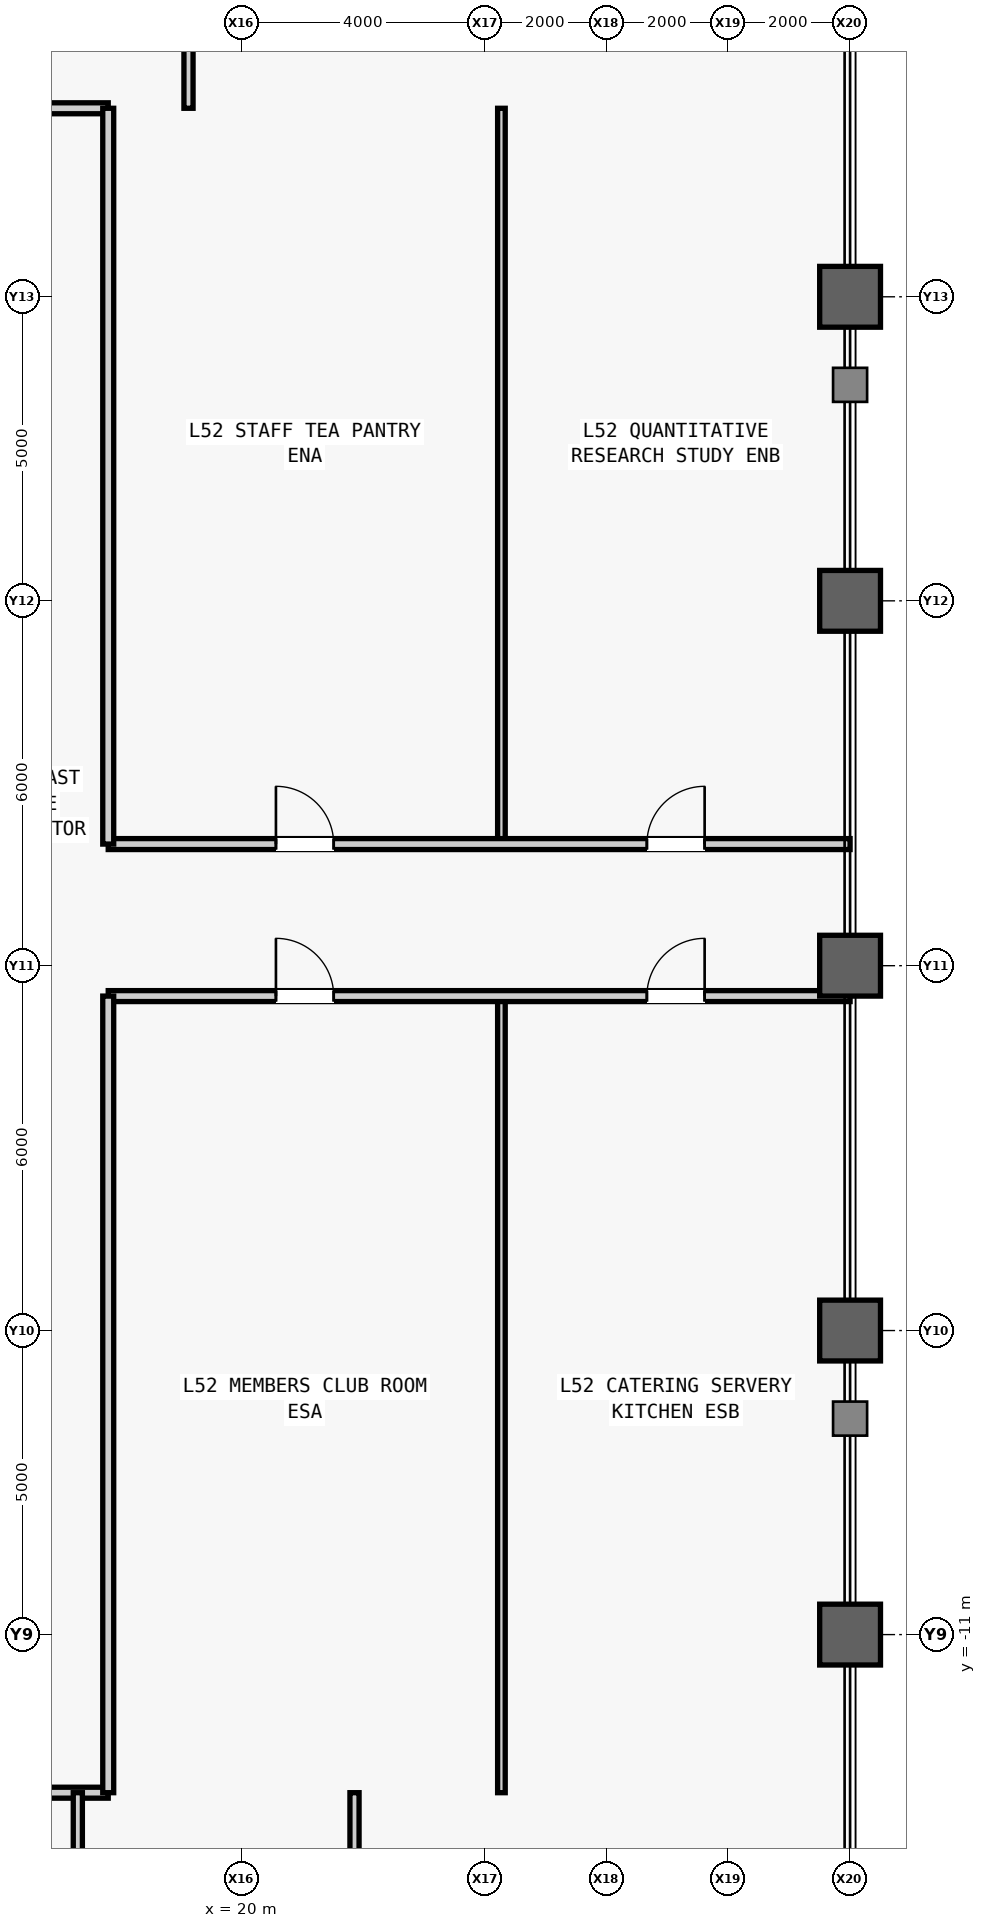
"""IFC4 building model, lengths in metres.
Left out: names, types, materials, properties, quantities, classifications, styles, units other than length and angle.
Written with IfcOpenShell. Run it as: python <this file> out.ifc"""

import sys

from ifc_helpers import new_model, si_unit, direction, frame, frame_2d, origin, origin_2d, place, context, subcontext, project, spatial, rectangle, hollow_rectangle, extrude, source, transform, mapped, element, fill, save


model = new_model("IFC4")
c1 = context("Model", 3, precision=1e-05, world=origin(), true_north=direction((0.0, 1.0)))
c2 = subcontext(c1, "Body", "Model", "MODEL_VIEW")
j1 = project(units=[si_unit("LENGTHUNIT", "METRE"), si_unit("PLANEANGLEUNIT", "RADIAN")], contexts=[c1])
p1 = place(None, origin())
s1 = spatial("IfcSite", under=j1, at=p1, CompositionType="ELEMENT")
p2 = place(p1, origin())
s2 = spatial("IfcBuilding", under=s1, at=p2, CompositionType="ELEMENT")
p3 = place(p2, frame((0.0, 0.0, 223.1)))
s3 = spatial("IfcBuildingStorey", under=s2, at=p3, CompositionType="ELEMENT", Elevation=223.1)
m1 = source(origin(), c2, "Body", "SweptSolid", [
    extrude(hollow_rectangle(XDim=1.0, YDim=1.0, WallThickness=0.055, at=origin_2d()), origin(), (0.0, 0.0, 1.0), 4.0),
])
for number, where, z_axis, x_axis in (
    (1, (30.0, -11.0, 0.0), (0.0, 0.0, 1.0), (1.0, 0.0, 0.0)),
    (2, (30.0, -6.0, 0.0), (0.0, 0.0, 1.0), (1.0, 0.0, 0.0)),
    (3, (30.0, 0.0, 0.0), (0.0, 0.0, 1.0), (1.0, 0.0, 0.0)),
    (4, (30.0, 6.0, 0.0), (0.0, 0.0, 1.0), (1.0, 0.0, 0.0)),
    (5, (30.0, 11.0, 0.0), (0.0, 0.0, 1.0), (1.0, 0.0, 0.0)),
):
    element("IfcColumn", number, at=place(p3, frame(where, z_axis=z_axis, x_axis=x_axis)), inside=s3, PredefinedType="COLUMN", context=c2, shape_type="MappedRepresentation", body=[
        mapped(m1, transform((0.0, 0.0, 0.0), scale=1.0)),
    ])
m2 = source(origin(), c2, "Body", "SweptSolid", [
    extrude(rectangle(XDim=2.45, YDim=0.18, at=frame_2d((1.225, 0.0))), origin(), (0.0, 0.0, 1.0), 3.78),
])
for number, where, z_axis, x_axis in (
    (6, (15.35, -13.6, 0.0), (0.0, 0.0, 1.0), (1.0, 0.0, 0.0)),
    (7, (15.35, 14.1, 0.0), (0.0, 0.0, 1.0), (1.0, 0.0, 0.0)),
):
    element("IfcWall", number, at=place(p3, frame(where, z_axis=z_axis, x_axis=x_axis)), inside=s3, PredefinedType="PARTITIONING", context=c2, shape_type="MappedRepresentation", body=[
        mapped(m2, transform((0.0, 0.0, 0.0), scale=1.0)),
    ])
m3 = source(origin(), c2, "Body", "SweptSolid", [
    extrude(rectangle(XDim=16.4, YDim=0.15, at=frame_2d((8.2, 0.0))), origin(), (0.0, 0.0, 1.0), 3.78),
])
p4 = place(p3, frame((17.3, -30.0, 0.0), z_axis=(0.0, 0.0, 1.0), x_axis=(0.0, 1.0, 0.0)))
e8 = element("IfcWall", 8, at=p4, inside=s3, PredefinedType="PARTITIONING", context=c2, shape_type="MappedRepresentation", body=[
    mapped(m3, transform((0.0, 0.0, 0.0), scale=1.0)),
])
m4 = source(origin(), c2, "Body", "SweptSolid", [
    extrude(rectangle(XDim=0.95, YDim=2.15, at=frame_2d((0.475, 1.075))), frame((0.0, 0.085, 0.0), z_axis=(0.0, -1.0, 0.0), x_axis=(1.0, 0.0, 0.0)), (0.0, 0.0, 1.0), 0.17),
])
p5 = place(p4, frame((11.825, 0.0, 0.0)))
e9 = element("IfcOpeningElement", 9, at=p5, cuts=e8, PredefinedType="OPENING", context=c2, shape_type="MappedRepresentation", body=[
    mapped(m4, transform((0.0, 0.0, 0.0), scale=1.0)),
])
p6 = place(p3, frame((21.85, -30.0, 0.0), z_axis=(0.0, 0.0, 1.0), x_axis=(0.0, 1.0, 0.0)))
e10 = element("IfcWall", 10, at=p6, inside=s3, PredefinedType="PARTITIONING", context=c2, shape_type="MappedRepresentation", body=[
    mapped(m3, transform((0.0, 0.0, 0.0), scale=1.0)),
])
p7 = place(p6, frame((11.825, 0.0, 0.0)))
e11 = element("IfcOpeningElement", 11, at=p7, cuts=e10, PredefinedType="OPENING", context=c2, shape_type="MappedRepresentation", body=[
    mapped(m4, transform((0.0, 0.0, 0.0), scale=1.0)),
])
m5 = source(origin(), c2, "Body", "SweptSolid", [
    extrude(rectangle(XDim=15.9, YDim=0.15, at=frame_2d((7.95, 0.0))), origin(), (0.0, 0.0, 1.0), 3.78),
])
p8 = place(p3, frame((19.12, 14.1, 0.0), z_axis=(0.0, 0.0, 1.0), x_axis=(0.0, 1.0, 0.0)))
e12 = element("IfcWall", 12, at=p8, inside=s3, PredefinedType="PARTITIONING", context=c2, shape_type="MappedRepresentation", body=[
    mapped(m5, transform((0.0, 0.0, 0.0), scale=1.0)),
])
p9 = place(p8, frame((11.45, 0.0, 0.0)))
e13 = element("IfcOpeningElement", 13, at=p9, cuts=e12, PredefinedType="OPENING", context=c2, shape_type="MappedRepresentation", body=[
    mapped(m4, transform((0.0, 0.0, 0.0), scale=1.0)),
])
m6 = source(origin(), c2, "Body", "SweptSolid", [
    extrude(rectangle(XDim=13.1, YDim=0.125, at=frame_2d((6.55, 0.0))), origin(), (0.0, 0.0, 1.0), 3.78),
])
p10 = place(p3, frame((24.266, -13.6, 0.0), z_axis=(0.0, 0.0, 1.0), x_axis=(0.0, 1.0, 0.0)))
e14 = element("IfcWall", 14, at=p10, inside=s3, PredefinedType="PARTITIONING", context=c2, shape_type="MappedRepresentation", body=[
    mapped(m6, transform((0.0, 0.0, 0.0), scale=1.0)),
])
m7 = source(origin(), c2, "Body", "SweptSolid", [
    extrude(rectangle(XDim=12.2, YDim=0.18, at=frame_2d((6.1, 0.0))), origin(), (0.0, 0.0, 1.0), 3.78),
])
p11 = place(p3, frame((17.8, -0.5, 0.0), z_axis=(0.0, 0.0, 1.0), x_axis=(1.0, 0.0, 0.0)))
e15 = element("IfcWall", 15, at=p11, inside=s3, PredefinedType="PARTITIONING", context=c2, shape_type="MappedRepresentation", body=[
    mapped(m7, transform((0.0, 0.0, 0.0), scale=1.0)),
])
m8 = source(origin(), c2, "Body", "SweptSolid", [
    extrude(rectangle(XDim=0.95, YDim=2.15, at=frame_2d((0.475, 1.075))), frame((0.0, 0.1, 0.0), z_axis=(0.0, -1.0, 0.0), x_axis=(1.0, 0.0, 0.0)), (0.0, 0.0, 1.0), 0.2),
])
p12 = place(p11, frame((2.758, 0.0, 0.0)))
e16 = element("IfcOpeningElement", 16, at=p12, cuts=e15, PredefinedType="OPENING", context=c2, shape_type="MappedRepresentation", body=[
    mapped(m8, transform((0.0, 0.0, 0.0), scale=1.0)),
])
p13 = place(p11, frame((8.858, 0.0, 0.0)))
e17 = element("IfcOpeningElement", 17, at=p13, cuts=e15, PredefinedType="OPENING", context=c2, shape_type="MappedRepresentation", body=[
    mapped(m8, transform((0.0, 0.0, 0.0), scale=1.0)),
])
m9 = source(origin(), c2, "Body", "SweptSolid", [
    extrude(rectangle(XDim=13.1, YDim=0.18, at=frame_2d((6.55, 0.0))), origin(), (0.0, 0.0, 1.0), 3.78),
])
p14 = place(p3, frame((17.8, -13.6, 0.0), z_axis=(0.0, 0.0, 1.0), x_axis=(0.0, 1.0, 0.0)))
e18 = element("IfcWall", 18, at=p14, inside=s3, PredefinedType="PARTITIONING", context=c2, shape_type="MappedRepresentation", body=[
    mapped(m9, transform((0.0, 0.0, 0.0), scale=1.0)),
])
m10 = source(origin(), c2, "Body", "SweptSolid", [
    extrude(rectangle(XDim=12.1, YDim=0.125, at=frame_2d((6.05, 0.0))), origin(), (0.0, 0.0, 1.0), 3.78),
])
p15 = place(p3, frame((24.266, 2.0, 0.0), z_axis=(0.0, 0.0, 1.0), x_axis=(0.0, 1.0, 0.0)))
e19 = element("IfcWall", 19, at=p15, inside=s3, PredefinedType="PARTITIONING", context=c2, shape_type="MappedRepresentation", body=[
    mapped(m10, transform((0.0, 0.0, 0.0), scale=1.0)),
])
p16 = place(p3, frame((17.8, 2.0, 0.0), z_axis=(0.0, 0.0, 1.0), x_axis=(1.0, 0.0, 0.0)))
e20 = element("IfcWall", 20, at=p16, inside=s3, PredefinedType="PARTITIONING", context=c2, shape_type="MappedRepresentation", body=[
    mapped(m7, transform((0.0, 0.0, 0.0), scale=1.0)),
])
p17 = place(p16, frame((2.758, 0.0, 0.0)))
e21 = element("IfcOpeningElement", 21, at=p17, cuts=e20, PredefinedType="OPENING", context=c2, shape_type="MappedRepresentation", body=[
    mapped(m8, transform((0.0, 0.0, 0.0), scale=1.0)),
])
p18 = place(p16, frame((8.858, 0.0, 0.0)))
e22 = element("IfcOpeningElement", 22, at=p18, cuts=e20, PredefinedType="OPENING", context=c2, shape_type="MappedRepresentation", body=[
    mapped(m8, transform((0.0, 0.0, 0.0), scale=1.0)),
])
m11 = source(origin(), c2, "Body", "SweptSolid", [
    extrude(rectangle(XDim=12.1, YDim=0.18, at=frame_2d((6.05, 0.0))), origin(), (0.0, 0.0, 1.0), 3.78),
])
p19 = place(p3, frame((17.8, 2.0, 0.0), z_axis=(0.0, 0.0, 1.0), x_axis=(0.0, 1.0, 0.0)))
e23 = element("IfcWall", 23, at=p19, inside=s3, PredefinedType="PARTITIONING", context=c2, shape_type="MappedRepresentation", body=[
    mapped(m11, transform((0.0, 0.0, 0.0), scale=1.0)),
])
m12 = source(origin(), c2, "Body", "SweptSolid", [
    extrude(rectangle(XDim=0.95, YDim=2.15, at=frame_2d((0.475, 1.075))), frame((0.0, 0.025, 0.0), z_axis=(0.0, -1.0, 0.0), x_axis=(1.0, 0.0, 0.0)), (0.0, 0.0, 1.0), 0.05),
])
p20 = place(p12, origin())
e24 = element("IfcDoor", 24, at=p20, inside=s3, OperationType="SINGLE_SWING_LEFT", PredefinedType="DOOR", context=c2, shape_type="MappedRepresentation", body=[
    mapped(m12, transform((0.0, 0.0, 0.0), scale=1.0)),
])
fill(e16, e24)
p21 = place(p13, origin())
e25 = element("IfcDoor", 25, at=p21, inside=s3, OperationType="SINGLE_SWING_RIGHT", PredefinedType="DOOR", context=c2, shape_type="MappedRepresentation", body=[
    mapped(m12, transform((0.0, 0.0, 0.0), scale=1.0)),
])
fill(e17, e25)
p22 = place(p17, origin())
e26 = element("IfcDoor", 26, at=p22, inside=s3, OperationType="SINGLE_SWING_LEFT", PredefinedType="DOOR", context=c2, shape_type="MappedRepresentation", body=[
    mapped(m12, transform((0.0, 0.0, 0.0), scale=1.0)),
])
fill(e21, e26)
p23 = place(p18, origin())
e27 = element("IfcDoor", 27, at=p23, inside=s3, OperationType="SINGLE_SWING_RIGHT", PredefinedType="DOOR", context=c2, shape_type="MappedRepresentation", body=[
    mapped(m12, transform((0.0, 0.0, 0.0), scale=1.0)),
])
fill(e22, e27)
save(model, sys.argv[1])
